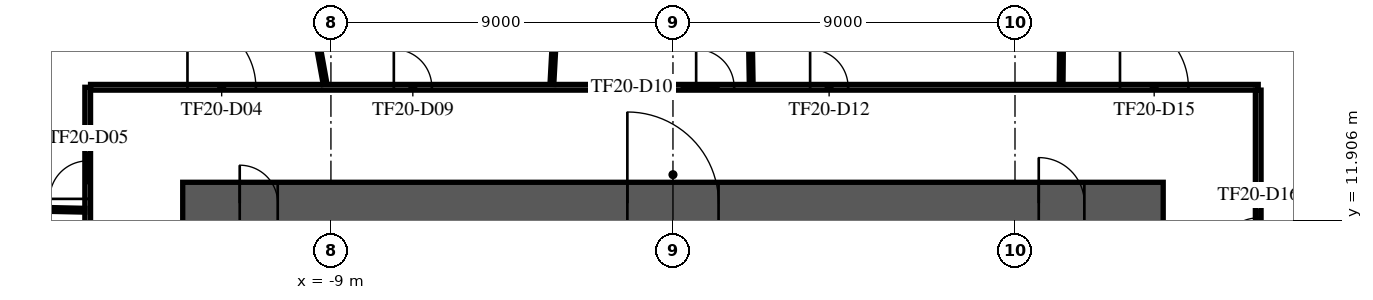
"""IFC4 building model, lengths in metres.
Left out: names, types, materials, properties, quantities, classifications, styles, units other than length and angle.
Written with IfcOpenShell. Run it as: python <this file> out.ifc"""

import sys

from ifc_helpers import new_model, si_unit, direction, frame, frame_2d, origin, place, context, subcontext, project, spatial, rectangle, extrude, element, fill, save


model = new_model("IFC4")
c1 = context("Model", 3, precision=1e-05, world=origin(), true_north=direction((0.0, 1.0)))
c2 = subcontext(c1, "Body", "Model", "MODEL_VIEW")
j1 = project(units=[si_unit("LENGTHUNIT", "METRE"), si_unit("PLANEANGLEUNIT", "RADIAN")], contexts=[c1])
p1 = place(None, origin())
s1 = spatial("IfcSite", under=j1, at=p1, CompositionType="ELEMENT")
p2 = place(p1, origin())
s2 = spatial("IfcBuilding", under=s1, at=p2, CompositionType="ELEMENT")
p3 = place(p2, frame((0.0, 0.0, 90.1)))
s3 = spatial("IfcBuildingStorey", under=s2, at=p3, CompositionType="ELEMENT", Elevation=90.1)
p4 = place(p3, frame((-12.9, 12.35, 0.0), z_axis=(0.0, 0.0, 1.0), x_axis=(1.0, 0.0, 0.0)))
e1 = element("IfcWall", 1, at=p4, inside=s3, PredefinedType="SHEAR", context=c2, shape_type="SweptSolid", body=[
    extrude(rectangle(XDim=25.8, YDim=1.1, at=frame_2d((12.9, 0.0))), origin(), (0.0, 0.0, 1.0), 3.58),
])
p5 = place(p4, frame((11.7, 0.0, 0.0)))
e2 = element("IfcOpeningElement", 2, at=p5, cuts=e1, PredefinedType="OPENING", context=c2, shape_type="SweptSolid", body=[
    extrude(rectangle(XDim=2.4, YDim=2.4, at=frame_2d((1.2, 1.2))), frame((0.0, 0.56, 0.0), z_axis=(0.0, -1.0, 0.0), x_axis=(1.0, 0.0, 0.0)), (0.0, 0.0, 1.0), 1.12),
])
p6 = place(p4, frame((22.525, 0.0, 0.0)))
e3 = element("IfcOpeningElement", 3, at=p6, cuts=e1, PredefinedType="OPENING", context=c2, shape_type="SweptSolid", body=[
    extrude(rectangle(XDim=1.2, YDim=2.1, at=frame_2d((0.6, 1.05))), frame((0.0, 0.56, 0.0), z_axis=(0.0, -1.0, 0.0), x_axis=(1.0, 0.0, 0.0)), (0.0, 0.0, 1.0), 1.12),
])
p7 = place(p4, frame((1.5, 0.0, 0.0)))
e4 = element("IfcOpeningElement", 4, at=p7, cuts=e1, PredefinedType="OPENING", context=c2, shape_type="SweptSolid", body=[
    extrude(rectangle(XDim=1.0, YDim=2.1, at=frame_2d((0.5, 1.05))), frame((0.0, 0.56, 0.0), z_axis=(0.0, -1.0, 0.0), x_axis=(1.0, 0.0, 0.0)), (0.0, 0.0, 1.0), 1.12),
])
p8 = place(p3, frame((-15.4, -15.4, 0.0), z_axis=(0.0, 0.0, 1.0), x_axis=(0.0, 1.0, 0.0)))
e5 = element("IfcWall", 5, at=p8, inside=s3, PredefinedType="PARTITIONING", context=c2, shape_type="SweptSolid", body=[
    extrude(rectangle(XDim=30.8, YDim=0.15, at=frame_2d((15.4, 0.0))), origin(), (0.0, 0.0, 1.0), 3.08),
])
p9 = place(p8, frame((22.967, 0.0, 0.0)))
e6 = element("IfcOpeningElement", 6, at=p9, cuts=e5, PredefinedType="OPENING", context=c2, shape_type="SweptSolid", body=[
    extrude(rectangle(XDim=1.8, YDim=2.1, at=frame_2d((0.9, 1.05))), frame((0.0, 0.085, 0.0), z_axis=(0.0, -1.0, 0.0), x_axis=(1.0, 0.0, 0.0)), (0.0, 0.0, 1.0), 0.17),
])
p10 = place(p8, frame((19.37, 0.0, 0.0)))
e7 = element("IfcOpeningElement", 7, at=p10, cuts=e5, PredefinedType="OPENING", context=c2, shape_type="SweptSolid", body=[
    extrude(rectangle(XDim=1.0, YDim=2.1, at=frame_2d((0.5, 1.05))), frame((0.0, 0.085, 0.0), z_axis=(0.0, -1.0, 0.0), x_axis=(1.0, 0.0, 0.0)), (0.0, 0.0, 1.0), 0.17),
])
p11 = place(p8, frame((7.15, 0.0, 0.0)))
e8 = element("IfcOpeningElement", 8, at=p11, cuts=e5, PredefinedType="OPENING", context=c2, shape_type="SweptSolid", body=[
    extrude(rectangle(XDim=1.0, YDim=2.1, at=frame_2d((0.5, 1.05))), frame((0.0, 0.085, 0.0), z_axis=(0.0, -1.0, 0.0), x_axis=(1.0, 0.0, 0.0)), (0.0, 0.0, 1.0), 0.17),
])
p12 = place(p8, frame((27.863, 0.0, 0.0)))
e9 = element("IfcOpeningElement", 9, at=p12, cuts=e5, PredefinedType="OPENING", context=c2, shape_type="SweptSolid", body=[
    extrude(rectangle(XDim=1.0, YDim=2.1, at=frame_2d((0.5, 1.05))), frame((0.0, 0.085, 0.0), z_axis=(0.0, -1.0, 0.0), x_axis=(1.0, 0.0, 0.0)), (0.0, 0.0, 1.0), 0.17),
])
p13 = place(p8, frame((2.8, 0.0, 0.0)))
e10 = element("IfcOpeningElement", 10, at=p13, cuts=e5, PredefinedType="OPENING", context=c2, shape_type="SweptSolid", body=[
    extrude(rectangle(XDim=1.0, YDim=2.1, at=frame_2d((0.5, 1.05))), frame((0.0, 0.085, 0.0), z_axis=(0.0, -1.0, 0.0), x_axis=(1.0, 0.0, 0.0)), (0.0, 0.0, 1.0), 0.17),
])
p14 = place(p3, frame((-15.325, 15.4, 0.0), z_axis=(0.0, 0.0, 1.0), x_axis=(1.0, 0.0, 0.0)))
e11 = element("IfcWall", 11, at=p14, inside=s3, PredefinedType="PARTITIONING", context=c2, shape_type="SweptSolid", body=[
    extrude(rectangle(XDim=30.725, YDim=0.15, at=frame_2d((15.362, 0.0))), origin(), (0.0, 0.0, 1.0), 3.08),
])
p15 = place(p14, frame((2.55, 0.0, 0.0)))
e12 = element("IfcOpeningElement", 12, at=p15, cuts=e11, PredefinedType="OPENING", context=c2, shape_type="SweptSolid", body=[
    extrude(rectangle(XDim=1.8, YDim=2.1, at=frame_2d((0.9, 1.05))), frame((0.0, 0.085, 0.0), z_axis=(0.0, -1.0, 0.0), x_axis=(1.0, 0.0, 0.0)), (0.0, 0.0, 1.0), 0.17),
])
p16 = place(p14, frame((7.98, 0.0, 0.0)))
e13 = element("IfcOpeningElement", 13, at=p16, cuts=e11, PredefinedType="OPENING", context=c2, shape_type="SweptSolid", body=[
    extrude(rectangle(XDim=1.0, YDim=2.1, at=frame_2d((0.5, 1.05))), frame((0.0, 0.085, 0.0), z_axis=(0.0, -1.0, 0.0), x_axis=(1.0, 0.0, 0.0)), (0.0, 0.0, 1.0), 0.17),
])
p17 = place(p14, frame((15.935, 0.0, 0.0)))
e14 = element("IfcOpeningElement", 14, at=p17, cuts=e11, PredefinedType="OPENING", context=c2, shape_type="SweptSolid", body=[
    extrude(rectangle(XDim=1.0, YDim=2.1, at=frame_2d((0.5, 1.05))), frame((0.0, 0.085, 0.0), z_axis=(0.0, -1.0, 0.0), x_axis=(1.0, 0.0, 0.0)), (0.0, 0.0, 1.0), 0.17),
])
p18 = place(p14, frame((18.934, 0.0, 0.0)))
e15 = element("IfcOpeningElement", 15, at=p18, cuts=e11, PredefinedType="OPENING", context=c2, shape_type="SweptSolid", body=[
    extrude(rectangle(XDim=1.0, YDim=2.1, at=frame_2d((0.5, 1.05))), frame((0.0, 0.085, 0.0), z_axis=(0.0, -1.0, 0.0), x_axis=(1.0, 0.0, 0.0)), (0.0, 0.0, 1.0), 0.17),
])
p19 = place(p14, frame((27.088, 0.0, 0.0)))
e16 = element("IfcOpeningElement", 16, at=p19, cuts=e11, PredefinedType="OPENING", context=c2, shape_type="SweptSolid", body=[
    extrude(rectangle(XDim=1.8, YDim=2.1, at=frame_2d((0.9, 1.05))), frame((0.0, 0.085, 0.0), z_axis=(0.0, -1.0, 0.0), x_axis=(1.0, 0.0, 0.0)), (0.0, 0.0, 1.0), 0.17),
])
p20 = place(p3, frame((15.4, -15.325, 0.0), z_axis=(0.0, 0.0, 1.0), x_axis=(0.0, 1.0, 0.0)))
e17 = element("IfcWall", 17, at=p20, inside=s3, PredefinedType="PARTITIONING", context=c2, shape_type="SweptSolid", body=[
    extrude(rectangle(XDim=30.65, YDim=0.15, at=frame_2d((15.325, 0.0))), origin(), (0.0, 0.0, 1.0), 3.08),
])
p21 = place(p20, frame((26.288, 0.0, 0.0)))
e18 = element("IfcOpeningElement", 18, at=p21, cuts=e17, PredefinedType="OPENING", context=c2, shape_type="SweptSolid", body=[
    extrude(rectangle(XDim=1.0, YDim=2.1, at=frame_2d((0.5, 1.05))), frame((0.0, 0.085, 0.0), z_axis=(0.0, -1.0, 0.0), x_axis=(1.0, 0.0, 0.0)), (0.0, 0.0, 1.0), 0.17),
])
p22 = place(p20, frame((21.949, 0.0, 0.0)))
e19 = element("IfcOpeningElement", 19, at=p22, cuts=e17, PredefinedType="OPENING", context=c2, shape_type="SweptSolid", body=[
    extrude(rectangle(XDim=1.0, YDim=2.1, at=frame_2d((0.5, 1.05))), frame((0.0, 0.085, 0.0), z_axis=(0.0, -1.0, 0.0), x_axis=(1.0, 0.0, 0.0)), (0.0, 0.0, 1.0), 0.17),
])
p23 = place(p20, frame((14.27, 0.0, 0.0)))
e20 = element("IfcOpeningElement", 20, at=p23, cuts=e17, PredefinedType="OPENING", context=c2, shape_type="SweptSolid", body=[
    extrude(rectangle(XDim=1.0, YDim=2.1, at=frame_2d((0.5, 1.05))), frame((0.0, 0.085, 0.0), z_axis=(0.0, -1.0, 0.0), x_axis=(1.0, 0.0, 0.0)), (0.0, 0.0, 1.0), 0.17),
])
p24 = place(p20, frame((6.038, 0.0, 0.0)))
e21 = element("IfcOpeningElement", 21, at=p24, cuts=e17, PredefinedType="OPENING", context=c2, shape_type="SweptSolid", body=[
    extrude(rectangle(XDim=1.8, YDim=2.1, at=frame_2d((0.9, 1.05))), frame((0.0, 0.085, 0.0), z_axis=(0.0, -1.0, 0.0), x_axis=(1.0, 0.0, 0.0)), (0.0, 0.0, 1.0), 0.17),
])
p25 = place(p3, frame((-29.361, 12.467, 0.0), z_axis=(0.0, 0.0, 1.0), x_axis=(0.999763547956, -0.021745072509, 0.0)))
e22 = element("IfcWall", 22, at=p25, inside=s3, PredefinedType="PARTITIONING", context=c2, shape_type="SweptSolid", body=[
    extrude(rectangle(XDim=13.888, YDim=0.1, at=frame_2d((6.944, 0.0))), origin(), (0.0, 0.0, 1.0), 2.96),
])
p26 = place(p3, frame((-10.924, 25.259, 0.0), z_axis=(0.0, 0.0, 1.0), x_axis=(0.178208444623, -0.983992759254, 0.0)))
e23 = element("IfcWall", 23, at=p26, inside=s3, PredefinedType="PARTITIONING", context=c2, shape_type="SweptSolid", body=[
    extrude(rectangle(XDim=9.934, YDim=0.1, at=frame_2d((4.967, 0.0))), origin(), (0.0, 0.0, 1.0), 2.83),
])
p27 = place(p3, frame((-3.186, 15.478, 0.0), z_axis=(0.0, 0.0, 1.0), x_axis=(0.054322200438, 0.998523459183, 0.0)))
e24 = element("IfcWall", 24, at=p27, inside=s3, PredefinedType="PARTITIONING", context=c2, shape_type="SweptSolid", body=[
    extrude(rectangle(XDim=12.535, YDim=0.1, at=frame_2d((6.267, 0.0))), origin(), (0.0, 0.0, 1.0), 2.83),
])
p28 = place(p3, frame((1.82, 29.399, 0.0), z_axis=(0.0, 0.0, 1.0), x_axis=(0.01714604741, -0.999852995724, 0.0)))
e25 = element("IfcWall", 25, at=p28, inside=s3, PredefinedType="PARTITIONING", context=c2, shape_type="SweptSolid", body=[
    extrude(rectangle(XDim=13.926, YDim=0.1, at=frame_2d((6.963, 0.0))), origin(), (0.0, 0.0, 1.0), 2.83),
])
p29 = place(p3, frame((10.214, 15.475, 0.0), z_axis=(0.0, 0.0, 1.0), x_axis=(0.00896123542, 0.999959847324, 0.0)))
e26 = element("IfcWall", 26, at=p29, inside=s3, PredefinedType="PARTITIONING", context=c2, shape_type="SweptSolid", body=[
    extrude(rectangle(XDim=16.701, YDim=0.1, at=frame_2d((8.35, 0.0))), origin(), (0.0, 0.0, 1.0), 2.83),
])
p30 = place(p5, origin())
e27 = element("IfcDoor", 27, at=p30, inside=s3, OperationType="SINGLE_SWING_LEFT", PredefinedType="DOOR", context=c2, shape_type="SweptSolid", body=[
    extrude(rectangle(XDim=2.4, YDim=2.4, at=frame_2d((1.2, 1.2))), frame((0.0, 0.025, 0.0), z_axis=(0.0, -1.0, 0.0), x_axis=(1.0, 0.0, 0.0)), (0.0, 0.0, 1.0), 0.05),
])
fill(e2, e27)
p31 = place(p6, origin())
e28 = element("IfcDoor", 28, at=p31, inside=s3, OperationType="SINGLE_SWING_LEFT", PredefinedType="DOOR", context=c2, shape_type="SweptSolid", body=[
    extrude(rectangle(XDim=1.2, YDim=2.1, at=frame_2d((0.6, 1.05))), frame((0.0, 0.025, 0.0), z_axis=(0.0, -1.0, 0.0), x_axis=(1.0, 0.0, 0.0)), (0.0, 0.0, 1.0), 0.05),
])
fill(e3, e28)
p32 = place(p7, origin())
e29 = element("IfcDoor", 29, at=p32, inside=s3, OperationType="SINGLE_SWING_LEFT", PredefinedType="DOOR", context=c2, shape_type="SweptSolid", body=[
    extrude(rectangle(XDim=1.0, YDim=2.1, at=frame_2d((0.5, 1.05))), frame((0.0, 0.025, 0.0), z_axis=(0.0, -1.0, 0.0), x_axis=(1.0, 0.0, 0.0)), (0.0, 0.0, 1.0), 0.05),
])
fill(e4, e29)
p33 = place(p15, origin())
e30 = element("IfcDoor", 30, at=p33, inside=s3, OperationType="DOUBLE_DOOR_SINGLE_SWING", PredefinedType="DOOR", context=c2, shape_type="SweptSolid", body=[
    extrude(rectangle(XDim=1.8, YDim=2.1, at=frame_2d((0.9, 1.05))), frame((0.0, 0.025, 0.0), z_axis=(0.0, -1.0, 0.0), x_axis=(1.0, 0.0, 0.0)), (0.0, 0.0, 1.0), 0.05),
])
fill(e12, e30)
p34 = place(p12, origin())
e31 = element("IfcDoor", 31, at=p34, inside=s3, OperationType="SINGLE_SWING_RIGHT", PredefinedType="DOOR", context=c2, shape_type="SweptSolid", body=[
    extrude(rectangle(XDim=1.0, YDim=2.1, at=frame_2d((0.5, 1.05))), frame((0.0, 0.025, 0.0), z_axis=(0.0, -1.0, 0.0), x_axis=(1.0, 0.0, 0.0)), (0.0, 0.0, 1.0), 0.05),
])
fill(e9, e31)
p35 = place(p16, origin())
e32 = element("IfcDoor", 32, at=p35, inside=s3, OperationType="SINGLE_SWING_LEFT", PredefinedType="DOOR", context=c2, shape_type="SweptSolid", body=[
    extrude(rectangle(XDim=1.0, YDim=2.1, at=frame_2d((0.5, 1.05))), frame((0.0, 0.025, 0.0), z_axis=(0.0, -1.0, 0.0), x_axis=(1.0, 0.0, 0.0)), (0.0, 0.0, 1.0), 0.05),
])
fill(e13, e32)
p36 = place(p17, origin())
e33 = element("IfcDoor", 33, at=p36, inside=s3, OperationType="SINGLE_SWING_RIGHT", PredefinedType="DOOR", context=c2, shape_type="SweptSolid", body=[
    extrude(rectangle(XDim=1.0, YDim=2.1, at=frame_2d((0.5, 1.05))), frame((0.0, 0.025, 0.0), z_axis=(0.0, -1.0, 0.0), x_axis=(1.0, 0.0, 0.0)), (0.0, 0.0, 1.0), 0.05),
])
fill(e14, e33)
p37 = place(p18, origin())
e34 = element("IfcDoor", 34, at=p37, inside=s3, OperationType="SINGLE_SWING_LEFT", PredefinedType="DOOR", context=c2, shape_type="SweptSolid", body=[
    extrude(rectangle(XDim=1.0, YDim=2.1, at=frame_2d((0.5, 1.05))), frame((0.0, 0.025, 0.0), z_axis=(0.0, -1.0, 0.0), x_axis=(1.0, 0.0, 0.0)), (0.0, 0.0, 1.0), 0.05),
])
fill(e15, e34)
p38 = place(p19, origin())
e35 = element("IfcDoor", 35, at=p38, inside=s3, OperationType="DOUBLE_DOOR_SINGLE_SWING", PredefinedType="DOOR", context=c2, shape_type="SweptSolid", body=[
    extrude(rectangle(XDim=1.8, YDim=2.1, at=frame_2d((0.9, 1.05))), frame((0.0, 0.025, 0.0), z_axis=(0.0, -1.0, 0.0), x_axis=(1.0, 0.0, 0.0)), (0.0, 0.0, 1.0), 0.05),
])
fill(e16, e35)
p39 = place(p21, frame((1.0, 0.0, 0.0), z_axis=(0.0, 0.0, 1.0), x_axis=(-1.0, 0.0, 0.0)))
e36 = element("IfcDoor", 36, at=p39, inside=s3, OperationType="SINGLE_SWING_RIGHT", PredefinedType="DOOR", context=c2, shape_type="SweptSolid", body=[
    extrude(rectangle(XDim=1.0, YDim=2.1, at=frame_2d((0.5, 1.05))), frame((0.0, 0.025, 0.0), z_axis=(0.0, -1.0, 0.0), x_axis=(1.0, 0.0, 0.0)), (0.0, 0.0, 1.0), 0.05),
])
fill(e18, e36)
save(model, sys.argv[1])
